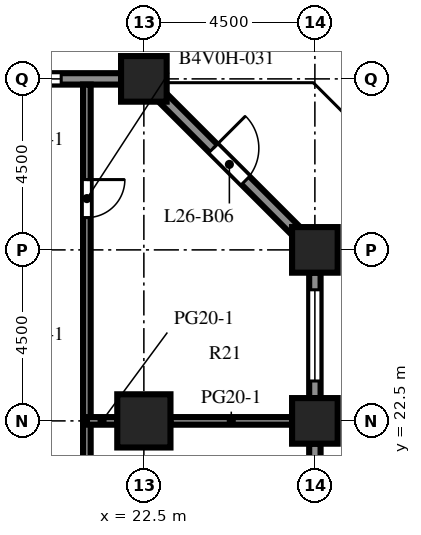
"""IFC4 building model, lengths in metres.
Left out: names, types, materials, properties, quantities, classifications, styles, units other than length and angle.
Written with IfcOpenShell. Run it as: python <this file> out.ifc"""

import sys

from ifc_helpers import new_model, si_unit, direction, frame, frame_2d, origin, origin_2d, place, context, subcontext, project, spatial, rectangle, extrude, element, fill, save


model = new_model("IFC4")
c1 = context("Model", 3, precision=1e-05, world=origin(), true_north=direction((0.0, 1.0)))
c2 = subcontext(c1, "Body", "Model", "MODEL_VIEW")
j1 = project(units=[si_unit("LENGTHUNIT", "METRE"), si_unit("PLANEANGLEUNIT", "RADIAN")], contexts=[c1])
p1 = place(None, origin())
s1 = spatial("IfcSite", under=j1, at=p1, CompositionType="ELEMENT")
p2 = place(p1, origin())
s2 = spatial("IfcBuilding", under=s1, at=p2, CompositionType="ELEMENT")
p3 = place(p2, frame((0.0, 0.0, 116.7)))
s3 = spatial("IfcBuildingStorey", under=s2, at=p3, CompositionType="ELEMENT", Elevation=116.7)
p4 = place(p3, frame((22.5, 31.5, 0.0), z_axis=(0.0, 0.0, 1.0), x_axis=(1.0, 0.0, 0.0)))
e1 = element("IfcColumn", 1, at=p4, inside=s3, PredefinedType="COLUMN", context=c2, shape_type="SweptSolid", body=[
    extrude(rectangle(XDim=1.2, YDim=1.2, at=origin_2d()), origin(), (0.0, 0.0, 1.0), 4.1),
])
for number, where, z_axis, x_axis in (
    (2, (27.0, 22.5, -0.45), (0.0, 0.0, 1.0), (1.0, 0.0, 0.0)),
    (3, (27.0, 27.0, -0.45), (0.0, 0.0, 1.0), (1.0, 0.0, 0.0)),
):
    element("IfcColumn", number, at=place(p3, frame(where, z_axis=z_axis, x_axis=x_axis)), inside=s3, PredefinedType="COLUMN", context=c2, shape_type="SweptSolid", body=[
        extrude(rectangle(XDim=1.2, YDim=1.2, at=origin_2d()), origin(), (0.0, 0.0, 1.0), 4.55),
    ])
p5 = place(p3, frame((22.5, 22.5, 0.0), z_axis=(0.0, 0.0, 1.0), x_axis=(1.0, 0.0, 0.0)))
e4 = element("IfcColumn", 4, at=p5, inside=s3, PredefinedType="COLUMN", context=c2, shape_type="SweptSolid", body=[
    extrude(rectangle(XDim=1.4, YDim=1.4, at=origin_2d()), origin(), (0.0, 0.0, 1.0), 4.1),
])
p6 = place(p3, frame((27.0, 21.9, 0.0), z_axis=(0.0, 0.0, 1.0), x_axis=(0.0, -1.0, 0.0)))
e5 = element("IfcWall", 5, at=p6, inside=s3, PredefinedType="SOLIDWALL", context=c2, shape_type="SweptSolid", body=[
    extrude(rectangle(XDim=3.3, YDim=0.3, at=frame_2d((1.65, 0.0))), origin(), (0.0, 0.0, 1.0), 2.75),
])
p7 = place(p6, frame((1.15, 0.0, 0.0)))
e6 = element("IfcOpeningElement", 6, at=p7, cuts=e5, PredefinedType="OPENING", context=c2, shape_type="SweptSolid", body=[
    extrude(rectangle(XDim=1.0, YDim=2.2, at=frame_2d((0.5, 1.1))), frame((0.0, 0.16, 0.0), z_axis=(0.0, -1.0, 0.0), x_axis=(1.0, 0.0, 0.0)), (0.0, 0.0, 1.0), 0.32),
])
p8 = place(p3, frame((27.0, 26.4, 0.0), z_axis=(0.0, 0.0, 1.0), x_axis=(0.0, -1.0, 0.0)))
e7 = element("IfcWall", 7, at=p8, inside=s3, PredefinedType="SOLIDWALL", context=c2, shape_type="SweptSolid", body=[
    extrude(rectangle(XDim=3.3, YDim=0.3, at=frame_2d((1.65, 0.0))), origin(), (0.0, 0.0, 1.0), 2.75),
])
p9 = place(p8, frame((0.45, 0.0, 0.8)))
e8 = element("IfcOpeningElement", 8, at=p9, cuts=e7, PredefinedType="OPENING", context=c2, shape_type="SweptSolid", body=[
    extrude(rectangle(XDim=2.4, YDim=1.7, at=frame_2d((1.2, 0.85))), frame((0.0, 0.16, 0.0), z_axis=(0.0, -1.0, 0.0), x_axis=(1.0, 0.0, 0.0)), (0.0, 0.0, 1.0), 0.32),
])
p10 = place(p3, frame((22.994, 31.006, 0.0), z_axis=(0.0, 0.0, 1.0), x_axis=(0.707106781187, -0.707106781187, 0.0)))
e9 = element("IfcWall", 9, at=p10, inside=s3, PredefinedType="SOLIDWALL", context=c2, shape_type="SweptSolid", body=[
    extrude(rectangle(XDim=4.967, YDim=0.3, at=frame_2d((2.483, 0.0))), origin(), (0.0, 0.0, 1.0), 2.75),
])
p11 = place(p10, frame((1.884, 0.0, 0.0)))
e10 = element("IfcOpeningElement", 10, at=p11, cuts=e9, PredefinedType="OPENING", context=c2, shape_type="SweptSolid", body=[
    extrude(rectangle(XDim=1.2, YDim=2.2, at=frame_2d((0.6, 1.1))), frame((0.0, 0.16, 0.0), z_axis=(0.0, -1.0, 0.0), x_axis=(1.0, 0.0, 0.0)), (0.0, 0.0, 1.0), 0.32),
])
p12 = place(p3, frame((18.6, 31.5, 0.0), z_axis=(0.0, 0.0, 1.0), x_axis=(1.0, 0.0, 0.0)))
e11 = element("IfcWall", 11, at=p12, inside=s3, PredefinedType="SOLIDWALL", context=c2, shape_type="SweptSolid", body=[
    extrude(rectangle(XDim=3.3, YDim=0.3, at=frame_2d((1.65, 0.0))), origin(), (0.0, 0.0, 1.0), 2.75),
])
p13 = place(p12, frame((0.525, 0.0, 0.8)))
e12 = element("IfcOpeningElement", 12, at=p13, cuts=e11, PredefinedType="OPENING", context=c2, shape_type="SweptSolid", body=[
    extrude(rectangle(XDim=1.2, YDim=1.7, at=frame_2d((0.6, 0.85))), frame((0.0, 0.16, 0.0), z_axis=(0.0, -1.0, 0.0), x_axis=(1.0, 0.0, 0.0)), (0.0, 0.0, 1.0), 0.32),
])
p14 = place(p3, frame((21.0, 31.35, 0.0), z_axis=(0.0, 0.0, 1.0), x_axis=(0.0, -1.0, 0.0)))
e13 = element("IfcWall", 13, at=p14, inside=s3, PredefinedType="PARTITIONING", context=c2, shape_type="SweptSolid", body=[
    extrude(rectangle(XDim=53.7, YDim=0.2, at=frame_2d((26.85, 0.0))), origin(), (0.0, 0.0, 1.0), 3.65),
])
p15 = place(p14, frame((47.5, 0.0, 0.0)))
e14 = element("IfcOpeningElement", 14, at=p15, cuts=e13, PredefinedType="OPENING", context=c2, shape_type="SweptSolid", body=[
    extrude(rectangle(XDim=1.0, YDim=2.1, at=frame_2d((0.5, 1.05))), frame((0.0, 0.11, 0.0), z_axis=(0.0, -1.0, 0.0), x_axis=(1.0, 0.0, 0.0)), (0.0, 0.0, 1.0), 0.22),
])
p16 = place(p14, frame((38.5, 0.0, 0.0)))
e15 = element("IfcOpeningElement", 15, at=p16, cuts=e13, PredefinedType="OPENING", context=c2, shape_type="SweptSolid", body=[
    extrude(rectangle(XDim=1.0, YDim=2.1, at=frame_2d((0.5, 1.05))), frame((0.0, 0.11, 0.0), z_axis=(0.0, -1.0, 0.0), x_axis=(1.0, 0.0, 0.0)), (0.0, 0.0, 1.0), 0.22),
])
p17 = place(p14, frame((32.75, 0.0, 0.0)))
e16 = element("IfcOpeningElement", 16, at=p17, cuts=e13, PredefinedType="OPENING", context=c2, shape_type="SweptSolid", body=[
    extrude(rectangle(XDim=1.0, YDim=2.1, at=frame_2d((0.5, 1.05))), frame((0.0, 0.11, 0.0), z_axis=(0.0, -1.0, 0.0), x_axis=(1.0, 0.0, 0.0)), (0.0, 0.0, 1.0), 0.22),
])
p18 = place(p14, frame((23.25, 0.0, 0.0)))
e17 = element("IfcOpeningElement", 17, at=p18, cuts=e13, PredefinedType="OPENING", context=c2, shape_type="SweptSolid", body=[
    extrude(rectangle(XDim=1.0, YDim=2.1, at=frame_2d((0.5, 1.05))), frame((0.0, 0.11, 0.0), z_axis=(0.0, -1.0, 0.0), x_axis=(1.0, 0.0, 0.0)), (0.0, 0.0, 1.0), 0.22),
])
p19 = place(p14, frame((11.5, 0.0, 0.0)))
e18 = element("IfcOpeningElement", 18, at=p19, cuts=e13, PredefinedType="OPENING", context=c2, shape_type="SweptSolid", body=[
    extrude(rectangle(XDim=1.0, YDim=2.1, at=frame_2d((0.5, 1.05))), frame((0.0, 0.11, 0.0), z_axis=(0.0, -1.0, 0.0), x_axis=(1.0, 0.0, 0.0)), (0.0, 0.0, 1.0), 0.22),
])
p20 = place(p14, frame((2.5, 0.0, 0.0)))
e19 = element("IfcOpeningElement", 19, at=p20, cuts=e13, PredefinedType="OPENING", context=c2, shape_type="SweptSolid", body=[
    extrude(rectangle(XDim=1.0, YDim=2.1, at=frame_2d((0.5, 1.05))), frame((0.0, 0.11, 0.0), z_axis=(0.0, -1.0, 0.0), x_axis=(1.0, 0.0, 0.0)), (0.0, 0.0, 1.0), 0.22),
])
p21 = place(p3, frame((21.0, 22.5, 0.0), z_axis=(0.0, 0.0, 1.0), x_axis=(1.0, 0.0, 0.0)))
e20 = element("IfcWall", 20, at=p21, inside=s3, PredefinedType="PARTITIONING", context=c2, shape_type="SweptSolid", body=[
    extrude(rectangle(XDim=0.8, YDim=0.2, at=frame_2d((0.4, 0.0))), origin(), (0.0, 0.0, 1.0), 3.65),
])
p22 = place(p3, frame((23.2, 22.5, 0.0), z_axis=(0.0, 0.0, 1.0), x_axis=(1.0, 0.0, 0.0)))
e21 = element("IfcWall", 21, at=p22, inside=s3, PredefinedType="PARTITIONING", context=c2, shape_type="SweptSolid", body=[
    extrude(rectangle(XDim=3.2, YDim=0.2, at=frame_2d((1.6, 0.0))), origin(), (0.0, 0.0, 1.0), 3.65),
])
p23 = place(p9, origin())
e22 = element("IfcWindow", 22, at=p23, inside=s3, PartitioningType="SINGLE_PANEL", PredefinedType="WINDOW", context=c2, shape_type="SweptSolid", body=[
    extrude(rectangle(XDim=2.4, YDim=1.7, at=frame_2d((1.2, 0.85))), frame((0.0, 0.03, 0.0), z_axis=(0.0, -1.0, 0.0), x_axis=(1.0, 0.0, 0.0)), (0.0, 0.0, 1.0), 0.06),
])
fill(e8, e22)
p24 = place(p11, origin())
e23 = element("IfcDoor", 23, at=p24, inside=s3, OperationType="SINGLE_SWING_LEFT", PredefinedType="DOOR", context=c2, shape_type="SweptSolid", body=[
    extrude(rectangle(XDim=1.2, YDim=2.2, at=frame_2d((0.6, 1.1))), frame((0.0, 0.025, 0.0), z_axis=(0.0, -1.0, 0.0), x_axis=(1.0, 0.0, 0.0)), (0.0, 0.0, 1.0), 0.05),
])
fill(e10, e23)
p25 = place(p13, origin())
e24 = element("IfcWindow", 24, at=p25, inside=s3, PartitioningType="SINGLE_PANEL", PredefinedType="WINDOW", context=c2, shape_type="SweptSolid", body=[
    extrude(rectangle(XDim=1.2, YDim=1.7, at=frame_2d((0.6, 0.85))), frame((0.0, 0.03, 0.0), z_axis=(0.0, -1.0, 0.0), x_axis=(1.0, 0.0, 0.0)), (0.0, 0.0, 1.0), 0.06),
])
fill(e12, e24)
p26 = place(p20, origin())
e25 = element("IfcDoor", 25, at=p26, inside=s3, OperationType="SINGLE_SWING_LEFT", PredefinedType="DOOR", context=c2, shape_type="SweptSolid", body=[
    extrude(rectangle(XDim=1.0, YDim=2.1, at=frame_2d((0.5, 1.05))), frame((0.0, 0.025, 0.0), z_axis=(0.0, -1.0, 0.0), x_axis=(1.0, 0.0, 0.0)), (0.0, 0.0, 1.0), 0.05),
])
fill(e19, e25)
save(model, sys.argv[1])
